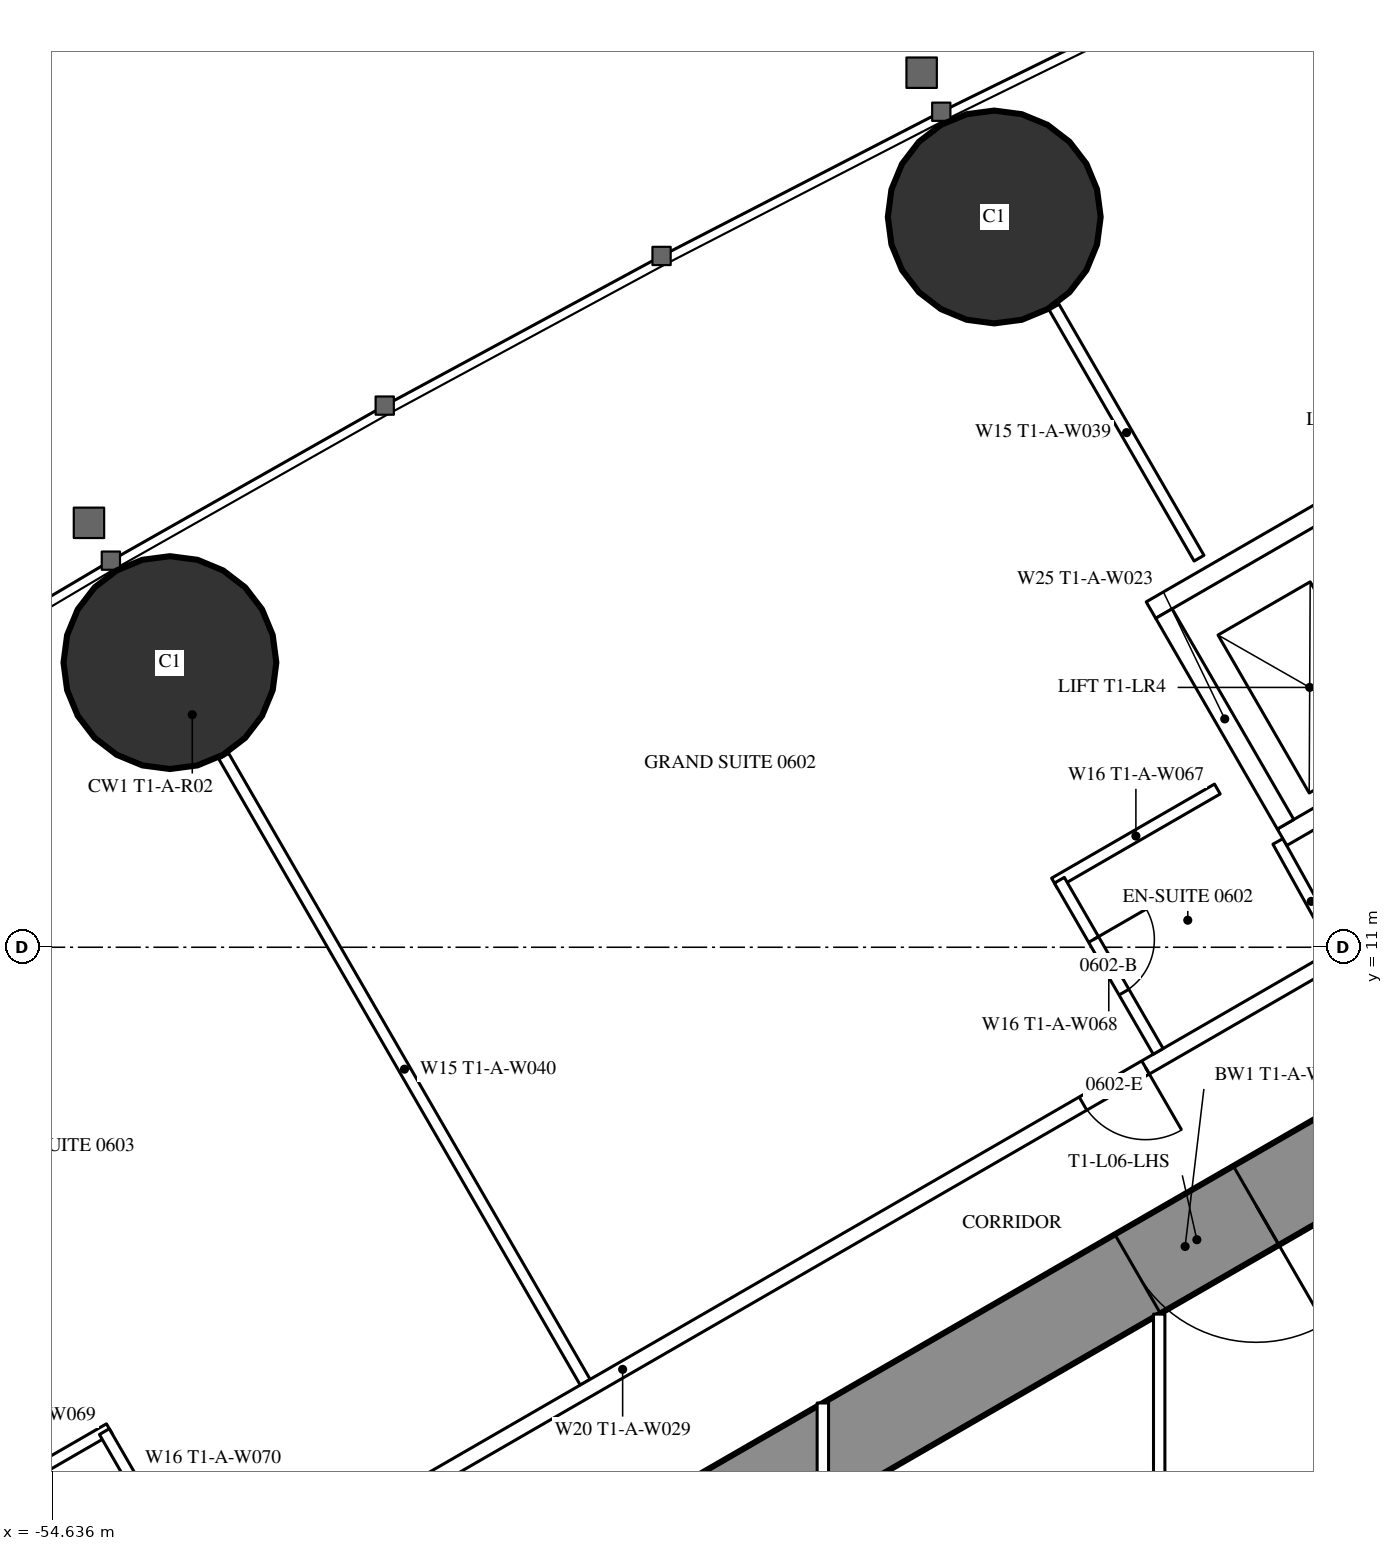
"""IFC4 building model, lengths in metres.
Left out: names, types, materials, properties, quantities, classifications, styles, units other than length and angle.
Written with IfcOpenShell. Run it as: python <this file> out.ifc"""

import sys

from ifc_helpers import new_model, si_unit, direction, frame, frame_2d, origin, origin_2d, place, context, subcontext, project, spatial, rectangle, hollow_circle, extrude, element, fill, save


model = new_model("IFC4")
c1 = context("Model", 3, precision=1e-05, world=origin(), true_north=direction((0.0, 1.0)))
c2 = subcontext(c1, "Body", "Model", "MODEL_VIEW")
j1 = project(units=[si_unit("LENGTHUNIT", "METRE"), si_unit("PLANEANGLEUNIT", "RADIAN")], contexts=[c1])
p1 = place(None, origin())
s1 = spatial("IfcSite", under=j1, at=p1, CompositionType="ELEMENT")
p2 = place(p1, origin())
s2 = spatial("IfcBuilding", under=s1, at=p2, CompositionType="ELEMENT")
p3 = place(p2, frame((0.0, 0.0, 28.5)))
s3 = spatial("IfcBuildingStorey", under=s2, at=p3, CompositionType="ELEMENT", Elevation=28.5)
for number, where, z_axis, x_axis in (
    (1, (-42.245, 20.607, 0.0), (0.0, 0.0, 1.0), (1.0, 0.0, 0.0)),
    (2, (-53.09, 14.745, 0.0), (0.0, 0.0, 1.0), (1.0, 0.0, 0.0)),
):
    element("IfcColumn", number, at=place(p3, frame(where, z_axis=z_axis, x_axis=x_axis)), inside=s3, PredefinedType="COLUMN", context=c2, shape_type="SweptSolid", body=[
        extrude(hollow_circle(Radius=1.4, WallThickness=0.12, at=origin_2d()), origin(), (0.0, 0.0, 1.0), 3.5),
    ])
p4 = place(p3, frame((-27.2, 14.3, 0.0), z_axis=(0.0, 0.0, 1.0), x_axis=(-0.866026593062, -0.499997940104, 0.0)))
e3 = element("IfcWall", 3, at=p4, inside=s3, PredefinedType="SHEAR", context=c2, shape_type="SweptSolid", body=[
    extrude(rectangle(XDim=28.946, YDim=1.2, at=frame_2d((14.473, 0.0))), origin(), (0.0, 0.0, 1.0), 3.5),
])
p5 = place(p4, frame((4.6, 0.0, 0.0)))
e4 = element("IfcOpeningElement", 4, at=p5, cuts=e3, PredefinedType="OPENING", context=c2, shape_type="SweptSolid", body=[
    extrude(rectangle(XDim=1.0, YDim=2.2, at=frame_2d((0.5, 1.1))), frame((0.0, 0.61, 0.0), z_axis=(0.0, -1.0, 0.0), x_axis=(1.0, 0.0, 0.0)), (0.0, 0.0, 1.0), 1.22),
])
p6 = place(p4, frame((13.395, 0.0, 0.0)))
e5 = element("IfcOpeningElement", 5, at=p6, cuts=e3, PredefinedType="OPENING", context=c2, shape_type="SweptSolid", body=[
    extrude(rectangle(XDim=1.8, YDim=2.2, at=frame_2d((0.9, 1.1))), frame((0.0, 0.61, 0.0), z_axis=(0.0, -1.0, 0.0), x_axis=(1.0, 0.0, 0.0)), (0.0, 0.0, 1.0), 1.22),
])
p7 = place(p3, frame((-47.627, 5.278, 0.0), z_axis=(0.0, 0.0, 1.0), x_axis=(-0.500009844318, 0.86601972009, 0.0)))
e6 = element("IfcWall", 6, at=p7, inside=s3, PredefinedType="PARTITIONING", context=c2, shape_type="SweptSolid", body=[
    extrude(rectangle(XDim=9.51, YDim=0.15, at=frame_2d((4.755, 0.0))), origin(), (0.0, 0.0, 1.0), 2.25),
])
p8 = place(p3, frame((-39.551, 16.119, 0.0), z_axis=(0.0, 0.0, 1.0), x_axis=(-0.500014214979, 0.866017196607, 0.0)))
e7 = element("IfcWall", 7, at=p8, inside=s3, PredefinedType="PARTITIONING", context=c2, shape_type="SweptSolid", body=[
    extrude(rectangle(XDim=3.815, YDim=0.15, at=frame_2d((1.907, 0.0))), origin(), (0.0, 0.0, 1.0), 3.25),
])
p9 = place(p3, frame((-37.7, 10.894, 0.0), z_axis=(0.0, 0.0, 1.0), x_axis=(-0.866027905338, -0.499995667157, 0.0)))
e8 = element("IfcWall", 8, at=p9, inside=s3, PredefinedType="PARTITIONING", context=c2, shape_type="SweptSolid", body=[
    extrude(rectangle(XDim=21.787, YDim=0.2, at=frame_2d((10.894, 0.0))), origin(), (0.0, 0.0, 1.0), 3.25),
])
p10 = place(p9, frame((16.008, 0.0, 0.0)))
e9 = element("IfcOpeningElement", 9, at=p10, cuts=e8, PredefinedType="OPENING", context=c2, shape_type="SweptSolid", body=[
    extrude(rectangle(XDim=0.95, YDim=2.2, at=frame_2d((0.475, 1.1))), frame((0.0, 0.11, 0.0), z_axis=(0.0, -1.0, 0.0), x_axis=(1.0, 0.0, 0.0)), (0.0, 0.0, 1.0), 0.22),
])
p11 = place(p9, frame((20.058, 0.0, 0.0)))
e10 = element("IfcOpeningElement", 10, at=p11, cuts=e8, PredefinedType="OPENING", context=c2, shape_type="SweptSolid", body=[
    extrude(rectangle(XDim=0.95, YDim=2.2, at=frame_2d((0.475, 1.1))), frame((0.0, 0.11, 0.0), z_axis=(0.0, -1.0, 0.0), x_axis=(1.0, 0.0, 0.0)), (0.0, 0.0, 1.0), 0.22),
])
p12 = place(p9, frame((2.95, 0.0, 0.0)))
e11 = element("IfcOpeningElement", 11, at=p12, cuts=e8, PredefinedType="OPENING", context=c2, shape_type="SweptSolid", body=[
    extrude(rectangle(XDim=0.95, YDim=2.2, at=frame_2d((0.475, 1.1))), frame((0.0, 0.11, 0.0), z_axis=(0.0, -1.0, 0.0), x_axis=(1.0, 0.0, 0.0)), (0.0, 0.0, 1.0), 0.22),
])
p13 = place(p3, frame((-38.513, 12.392, 0.0), z_axis=(0.0, 0.0, 1.0), x_axis=(0.485585508183, -0.874189175317, 0.0)))
e12 = element("IfcWall", 12, at=p13, inside=s3, PredefinedType="PARTITIONING", context=c2, shape_type="SweptSolid", body=[
    extrude(rectangle(XDim=1.805, YDim=0.15, at=frame_2d((0.902, 0.0))), origin(), (0.0, 0.0, 1.0), 3.25),
])
p14 = place(p3, frame((-53.888, 4.665, 0.0), z_axis=(0.0, 0.0, 1.0), x_axis=(-0.866006523861, -0.500032699561, 0.0)))
e13 = element("IfcWall", 13, at=p14, inside=s3, PredefinedType="PARTITIONING", context=c2, shape_type="SweptSolid", body=[
    extrude(rectangle(XDim=2.475, YDim=0.15, at=frame_2d((1.237, 0.0))), origin(), (0.0, 0.0, 1.0), 3.25),
])
p15 = place(p3, frame((-52.653, 2.376, 0.0), z_axis=(0.0, 0.0, 1.0), x_axis=(-0.500006934395, 0.866021400173, 0.0)))
e14 = element("IfcWall", 14, at=p15, inside=s3, PredefinedType="PARTITIONING", context=c2, shape_type="SweptSolid", body=[
    extrude(rectangle(XDim=2.6, YDim=0.15, at=frame_2d((1.3, 0.0))), origin(), (0.0, 0.0, 1.0), 3.25),
])
p16 = place(p15, frame((0.9, 0.0, 0.0)))
e15 = element("IfcOpeningElement", 15, at=p16, cuts=e14, PredefinedType="OPENING", context=c2, shape_type="SweptSolid", body=[
    extrude(rectangle(XDim=0.8, YDim=2.2, at=frame_2d((0.4, 1.1))), frame((0.0, 0.085, 0.0), z_axis=(0.0, -1.0, 0.0), x_axis=(1.0, 0.0, 0.0)), (0.0, 0.0, 1.0), 0.17),
])
p17 = place(p3, frame((-39.31, 13.082, 0.0), z_axis=(0.0, 0.0, 1.0), x_axis=(-0.866031185235, -0.4999899861, 0.0)))
e16 = element("IfcWall", 16, at=p17, inside=s3, PredefinedType="PARTITIONING", context=c2, shape_type="SweptSolid", body=[
    extrude(rectangle(XDim=2.475, YDim=0.15, at=frame_2d((1.238, 0.0))), origin(), (0.0, 0.0, 1.0), 3.25),
])
p18 = place(p3, frame((-40.088, 9.63, 0.0), z_axis=(0.0, 0.0, 1.0), x_axis=(-0.500006934395, 0.866021400173, 0.0)))
e17 = element("IfcWall", 17, at=p18, inside=s3, PredefinedType="PARTITIONING", context=c2, shape_type="SweptSolid", body=[
    extrude(rectangle(XDim=2.6, YDim=0.15, at=frame_2d((1.3, 0.0))), origin(), (0.0, 0.0, 1.0), 3.25),
])
p19 = place(p18, frame((0.9, 0.0, 0.0)))
e18 = element("IfcOpeningElement", 18, at=p19, cuts=e17, PredefinedType="OPENING", context=c2, shape_type="SweptSolid", body=[
    extrude(rectangle(XDim=0.8, YDim=2.2, at=frame_2d((0.4, 1.1))), frame((0.0, 0.085, 0.0), z_axis=(0.0, -1.0, 0.0), x_axis=(1.0, 0.0, 0.0)), (0.0, 0.0, 1.0), 0.17),
])
p20 = place(p3, frame((-40.075, 6.174, 0.0), z_axis=(0.0, 0.0, 1.0), x_axis=(0.0, -1.0, 0.0)))
e19 = element("IfcWall", 19, at=p20, inside=s3, PredefinedType="PARTITIONING", context=c2, shape_type="SweptSolid", body=[
    extrude(rectangle(XDim=7.374, YDim=0.15, at=frame_2d((3.687, 0.0))), origin(), (0.0, 0.0, 1.0), 3.25),
])
p21 = place(p20, frame((2.787, 0.0, 0.0)))
e20 = element("IfcOpeningElement", 20, at=p21, cuts=e19, PredefinedType="OPENING", context=c2, shape_type="SweptSolid", body=[
    extrude(rectangle(XDim=1.8, YDim=2.2, at=frame_2d((0.9, 1.1))), frame((0.0, 0.085, 0.0), z_axis=(0.0, -1.0, 0.0), x_axis=(1.0, 0.0, 0.0)), (0.0, 0.0, 1.0), 0.17),
])
p22 = place(p3, frame((-44.5, 5.005, 0.0), z_axis=(0.0, 0.0, 1.0), x_axis=(0.0, -1.0, 0.0)))
e21 = element("IfcWall", 21, at=p22, inside=s3, PredefinedType="PARTITIONING", context=c2, shape_type="SweptSolid", body=[
    extrude(rectangle(XDim=10.009, YDim=0.15, at=frame_2d((5.005, 0.0))), origin(), (0.0, 0.0, 1.0), 2.45),
])
p23 = place(p22, frame((2.002, 0.0, 0.0)))
e22 = element("IfcOpeningElement", 22, at=p23, cuts=e21, PredefinedType="OPENING", context=c2, shape_type="SweptSolid", body=[
    extrude(rectangle(XDim=1.0, YDim=2.2, at=frame_2d((0.5, 1.1))), frame((0.0, 0.085, 0.0), z_axis=(0.0, -1.0, 0.0), x_axis=(1.0, 0.0, 0.0)), (0.0, 0.0, 1.0), 0.17),
])
p24 = place(p22, frame((7.007, 0.0, 0.0)))
e23 = element("IfcOpeningElement", 23, at=p24, cuts=e21, PredefinedType="OPENING", context=c2, shape_type="SweptSolid", body=[
    extrude(rectangle(XDim=1.0, YDim=2.2, at=frame_2d((0.5, 1.1))), frame((0.0, 0.085, 0.0), z_axis=(0.0, -1.0, 0.0), x_axis=(1.0, 0.0, 0.0)), (0.0, 0.0, 1.0), 0.17),
])
p25 = place(p3, frame((-31.01, 16.747, 0.0), z_axis=(0.0, 0.0, 1.0), x_axis=(-0.866028165386, -0.499995216735, 0.0)))
e24 = element("IfcWall", 24, at=p25, inside=s3, PredefinedType="PARTITIONING", context=c2, shape_type="SweptSolid", body=[
    extrude(rectangle(XDim=8.6, YDim=0.25, at=frame_2d((4.3, 0.0))), origin(), (0.0, 0.0, 1.0), 3.25),
])
p26 = place(p25, frame((0.75, 0.0, 0.0)))
e25 = element("IfcOpeningElement", 25, at=p26, cuts=e24, PredefinedType="OPENING", context=c2, shape_type="SweptSolid", body=[
    extrude(rectangle(XDim=1.1, YDim=2.2, at=frame_2d((0.55, 1.1))), frame((0.0, 0.135, 0.0), z_axis=(0.0, -1.0, 0.0), x_axis=(1.0, 0.0, 0.0)), (0.0, 0.0, 1.0), 0.27),
])
p27 = place(p25, frame((2.75, 0.0, 0.0)))
e26 = element("IfcOpeningElement", 26, at=p27, cuts=e24, PredefinedType="OPENING", context=c2, shape_type="SweptSolid", body=[
    extrude(rectangle(XDim=1.1, YDim=2.2, at=frame_2d((0.55, 1.1))), frame((0.0, 0.135, 0.0), z_axis=(0.0, -1.0, 0.0), x_axis=(1.0, 0.0, 0.0)), (0.0, 0.0, 1.0), 0.27),
])
p28 = place(p25, frame((4.75, 0.0, 0.0)))
e27 = element("IfcOpeningElement", 27, at=p28, cuts=e24, PredefinedType="OPENING", context=c2, shape_type="SweptSolid", body=[
    extrude(rectangle(XDim=1.1, YDim=2.2, at=frame_2d((0.55, 1.1))), frame((0.0, 0.135, 0.0), z_axis=(0.0, -1.0, 0.0), x_axis=(1.0, 0.0, 0.0)), (0.0, 0.0, 1.0), 0.27),
])
p29 = place(p25, frame((6.75, 0.0, 0.0)))
e28 = element("IfcOpeningElement", 28, at=p29, cuts=e24, PredefinedType="OPENING", context=c2, shape_type="SweptSolid", body=[
    extrude(rectangle(XDim=1.1, YDim=2.2, at=frame_2d((0.55, 1.1))), frame((0.0, 0.135, 0.0), z_axis=(0.0, -1.0, 0.0), x_axis=(1.0, 0.0, 0.0)), (0.0, 0.0, 1.0), 0.27),
])
p30 = place(p3, frame((-32.736, 19.736, 0.0), z_axis=(0.0, 0.0, 1.0), x_axis=(-0.866028165386, -0.499995216735, 0.0)))
e29 = element("IfcWall", 29, at=p30, inside=s3, PredefinedType="PARTITIONING", context=c2, shape_type="SweptSolid", body=[
    extrude(rectangle(XDim=8.6, YDim=0.25, at=frame_2d((4.3, 0.0))), origin(), (0.0, 0.0, 1.0), 3.25),
])
p31 = place(p3, frame((-38.413, 12.618, 0.0), z_axis=(0.0, 0.0, 1.0), x_axis=(-0.499872130319, 0.866099216793, 0.0)))
e30 = element("IfcWall", 30, at=p31, inside=s3, PredefinedType="PARTITIONING", context=c2, shape_type="SweptSolid", body=[
    extrude(rectangle(XDim=3.2, YDim=0.25, at=frame_2d((1.6, 0.0))), origin(), (0.0, 0.0, 1.0), 3.25),
])
p32 = place(p19, origin())
e31 = element("IfcDoor", 31, at=p32, inside=s3, OperationType="SINGLE_SWING_RIGHT", PredefinedType="DOOR", context=c2, shape_type="SweptSolid", body=[
    extrude(rectangle(XDim=0.8, YDim=2.2, at=frame_2d((0.4, 1.1))), frame((0.0, 0.025, 0.0), z_axis=(0.0, -1.0, 0.0), x_axis=(1.0, 0.0, 0.0)), (0.0, 0.0, 1.0), 0.05),
])
fill(e18, e31)
p33 = place(p12, origin())
e32 = element("IfcDoor", 32, at=p33, inside=s3, OperationType="SINGLE_SWING_LEFT", PredefinedType="DOOR", context=c2, shape_type="SweptSolid", body=[
    extrude(rectangle(XDim=0.95, YDim=2.2, at=frame_2d((0.475, 1.1))), frame((0.0, 0.025, 0.0), z_axis=(0.0, -1.0, 0.0), x_axis=(1.0, 0.0, 0.0)), (0.0, 0.0, 1.0), 0.05),
])
fill(e11, e32)
p34 = place(p6, origin())
e33 = element("IfcDoor", 33, at=p34, inside=s3, OperationType="DOUBLE_DOOR_SINGLE_SWING", PredefinedType="DOOR", context=c2, shape_type="SweptSolid", body=[
    extrude(rectangle(XDim=1.8, YDim=2.2, at=frame_2d((0.9, 1.1))), frame((0.0, 0.025, 0.0), z_axis=(0.0, -1.0, 0.0), x_axis=(1.0, 0.0, 0.0)), (0.0, 0.0, 1.0), 0.05),
])
fill(e5, e33)
save(model, sys.argv[1])
